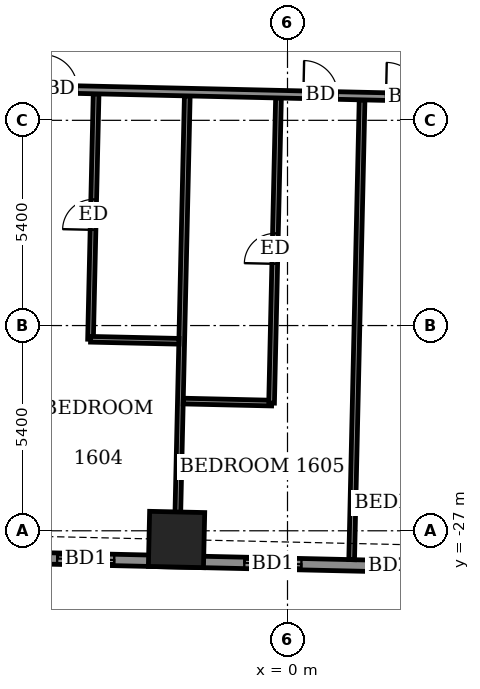
"""IFC4 building model, lengths in metres.
Left out: names, types, materials, properties, quantities, classifications, styles, units other than length and angle.
Written with IfcOpenShell. Run it as: python <this file> out.ifc"""

import sys

from ifc_helpers import new_model, si_unit, direction, frame, frame_2d, origin, origin_2d, place, context, subcontext, project, spatial, rectangle, extrude, element, fill, save


model = new_model("IFC4")
c1 = context("Model", 3, precision=1e-05, world=origin(), true_north=direction((0.0, 1.0)))
c2 = subcontext(c1, "Body", "Model", "MODEL_VIEW")
j1 = project(units=[si_unit("LENGTHUNIT", "METRE"), si_unit("PLANEANGLEUNIT", "RADIAN")], contexts=[c1])
p1 = place(None, origin())
s1 = spatial("IfcSite", under=j1, at=p1, CompositionType="ELEMENT")
p2 = place(p1, origin())
s2 = spatial("IfcBuilding", under=s1, at=p2, CompositionType="ELEMENT")
p3 = place(p2, frame((0.0, 0.0, 67.5)))
s3 = spatial("IfcBuildingStorey", under=s2, at=p3, CompositionType="ELEMENT", Elevation=67.5)
p4 = place(p3, frame((-2.92, -27.229, -0.55), z_axis=(0.0, 0.0, 1.0), x_axis=(0.999742783124, -0.022679673549, 0.0)))
e1 = element("IfcColumn", 1, at=p4, inside=s3, PredefinedType="COLUMN", context=c2, shape_type="SweptSolid", body=[
    extrude(rectangle(XDim=1.45, YDim=1.45, at=origin_2d()), origin(), (0.0, 0.0, 1.0), 3.6),
])
p5 = place(p3, frame((-24.007, -27.326, 0.0), z_axis=(0.0, 0.0, 1.0), x_axis=(0.999742536491, -0.022690542744, 0.0)))
e2 = element("IfcWall", 2, at=p5, inside=s3, PredefinedType="SOLIDWALL", context=c2, shape_type="SweptSolid", body=[
    extrude(rectangle(XDim=49.236, YDim=0.3, at=frame_2d((24.618, 0.0))), origin(), (0.0, 0.0, 1.0), 3.05),
])
p6 = place(p5, frame((1.391, 0.0, 0.0)))
e3 = element("IfcOpeningElement", 3, at=p6, cuts=e2, PredefinedType="OPENING", context=c2, shape_type="SweptSolid", body=[
    extrude(rectangle(XDim=1.2, YDim=2.4, at=frame_2d((0.6, 1.2))), frame((0.0, 0.16, 0.0), z_axis=(0.0, -1.0, 0.0), x_axis=(1.0, 0.0, 0.0)), (0.0, 0.0, 1.0), 0.32),
])
p7 = place(p5, frame((3.901, 0.0, 0.0)))
e4 = element("IfcOpeningElement", 4, at=p7, cuts=e2, PredefinedType="OPENING", context=c2, shape_type="SweptSolid", body=[
    extrude(rectangle(XDim=1.5, YDim=2.4, at=frame_2d((0.75, 1.2))), frame((0.0, 0.16, 0.0), z_axis=(0.0, -1.0, 0.0), x_axis=(1.0, 0.0, 0.0)), (0.0, 0.0, 1.0), 0.32),
])
p8 = place(p5, frame((9.1, 0.0, 0.0)))
e5 = element("IfcOpeningElement", 5, at=p8, cuts=e2, PredefinedType="OPENING", context=c2, shape_type="SweptSolid", body=[
    extrude(rectangle(XDim=1.5, YDim=2.4, at=frame_2d((0.75, 1.2))), frame((0.0, 0.16, 0.0), z_axis=(0.0, -1.0, 0.0), x_axis=(1.0, 0.0, 0.0)), (0.0, 0.0, 1.0), 0.32),
])
p9 = place(p5, frame((14.889, 0.0, 0.0)))
e6 = element("IfcOpeningElement", 6, at=p9, cuts=e2, PredefinedType="OPENING", context=c2, shape_type="SweptSolid", body=[
    extrude(rectangle(XDim=1.5, YDim=2.4, at=frame_2d((0.75, 1.2))), frame((0.0, 0.16, 0.0), z_axis=(0.0, -1.0, 0.0), x_axis=(1.0, 0.0, 0.0)), (0.0, 0.0, 1.0), 0.32),
])
p10 = place(p5, frame((17.952, 0.0, 0.0)))
e7 = element("IfcOpeningElement", 7, at=p10, cuts=e2, PredefinedType="OPENING", context=c2, shape_type="SweptSolid", body=[
    extrude(rectangle(XDim=1.5, YDim=2.4, at=frame_2d((0.75, 1.2))), frame((0.0, 0.16, 0.0), z_axis=(0.0, -1.0, 0.0), x_axis=(1.0, 0.0, 0.0)), (0.0, 0.0, 1.0), 0.32),
])
p11 = place(p5, frame((22.878, 0.0, 0.0)))
e8 = element("IfcOpeningElement", 8, at=p11, cuts=e2, PredefinedType="OPENING", context=c2, shape_type="SweptSolid", body=[
    extrude(rectangle(XDim=1.5, YDim=2.4, at=frame_2d((0.75, 1.2))), frame((0.0, 0.16, 0.0), z_axis=(0.0, -1.0, 0.0), x_axis=(1.0, 0.0, 0.0)), (0.0, 0.0, 1.0), 0.32),
])
p12 = place(p5, frame((26.091, 0.0, 0.0)))
e9 = element("IfcOpeningElement", 9, at=p12, cuts=e2, PredefinedType="OPENING", context=c2, shape_type="SweptSolid", body=[
    extrude(rectangle(XDim=1.2, YDim=2.4, at=frame_2d((0.6, 1.2))), frame((0.0, 0.16, 0.0), z_axis=(0.0, -1.0, 0.0), x_axis=(1.0, 0.0, 0.0)), (0.0, 0.0, 1.0), 0.32),
])
p13 = place(p5, frame((31.754, 0.0, 0.0)))
e10 = element("IfcOpeningElement", 10, at=p13, cuts=e2, PredefinedType="OPENING", context=c2, shape_type="SweptSolid", body=[
    extrude(rectangle(XDim=1.5, YDim=2.4, at=frame_2d((0.75, 1.2))), frame((0.0, 0.16, 0.0), z_axis=(0.0, -1.0, 0.0), x_axis=(1.0, 0.0, 0.0)), (0.0, 0.0, 1.0), 0.32),
])
p14 = place(p5, frame((36.854, 0.0, 0.0)))
e11 = element("IfcOpeningElement", 11, at=p14, cuts=e2, PredefinedType="OPENING", context=c2, shape_type="SweptSolid", body=[
    extrude(rectangle(XDim=1.5, YDim=2.4, at=frame_2d((0.75, 1.2))), frame((0.0, 0.16, 0.0), z_axis=(0.0, -1.0, 0.0), x_axis=(1.0, 0.0, 0.0)), (0.0, 0.0, 1.0), 0.32),
])
p15 = place(p5, frame((39.917, 0.0, 0.0)))
e12 = element("IfcOpeningElement", 12, at=p15, cuts=e2, PredefinedType="OPENING", context=c2, shape_type="SweptSolid", body=[
    extrude(rectangle(XDim=1.5, YDim=2.4, at=frame_2d((0.75, 1.2))), frame((0.0, 0.16, 0.0), z_axis=(0.0, -1.0, 0.0), x_axis=(1.0, 0.0, 0.0)), (0.0, 0.0, 1.0), 0.32),
])
p16 = place(p5, frame((45.072, 0.0, 0.9)))
e13 = element("IfcOpeningElement", 13, at=p16, cuts=e2, PredefinedType="OPENING", context=c2, shape_type="SweptSolid", body=[
    extrude(rectangle(XDim=2.4, YDim=1.5, at=frame_2d((1.2, 0.75))), frame((0.0, 0.16, 0.0), z_axis=(0.0, -1.0, 0.0), x_axis=(1.0, 0.0, 0.0)), (0.0, 0.0, 1.0), 0.32),
])
p17 = place(p3, frame((-2.911, -27.655, 0.0), z_axis=(0.0, 0.0, 1.0), x_axis=(0.02263616477, 0.999743769195, 0.0)))
e14 = element("IfcWall", 14, at=p17, inside=s3, PredefinedType="PARTITIONING", context=c2, shape_type="SweptSolid", body=[
    extrude(rectangle(XDim=12.101, YDim=0.15, at=frame_2d((6.051, 0.0))), origin(), (0.0, 0.0, 1.0), 3.05),
])
p18 = place(p3, frame((1.688, -27.759, 0.0), z_axis=(0.0, 0.0, 1.0), x_axis=(0.02263844782, 0.9997437175, 0.0)))
e15 = element("IfcWall", 15, at=p18, inside=s3, PredefinedType="PARTITIONING", context=c2, shape_type="SweptSolid", body=[
    extrude(rectangle(XDim=12.1, YDim=0.15, at=frame_2d((6.05, 0.0))), origin(), (0.0, 0.0, 1.0), 2.55),
])
p19 = place(p3, frame((-2.742, -23.587, 0.0), z_axis=(0.0, 0.0, 1.0), x_axis=(0.999740478815, -0.022781023197, 0.0)))
e16 = element("IfcWall", 16, at=p19, inside=s3, PredefinedType="PARTITIONING", context=c2, shape_type="SweptSolid", body=[
    extrude(rectangle(XDim=2.325, YDim=0.15, at=frame_2d((1.163, 0.0))), origin(), (0.0, 0.0, 1.0), 3.05),
])
p20 = place(p3, frame((-0.419, -23.64, 0.0), z_axis=(0.0, 0.0, 1.0), x_axis=(0.022650959747, 0.999743434098, 0.0)))
e17 = element("IfcWall", 17, at=p20, inside=s3, PredefinedType="PARTITIONING", context=c2, shape_type="SweptSolid", body=[
    extrude(rectangle(XDim=8.03, YDim=0.15, at=frame_2d((4.015, 0.0))), origin(), (0.0, 0.0, 1.0), 3.05),
])
p21 = place(p20, frame((3.665, 0.0, 0.0)))
e18 = element("IfcOpeningElement", 18, at=p21, cuts=e17, PredefinedType="OPENING", context=c2, shape_type="SweptSolid", body=[
    extrude(rectangle(XDim=0.8, YDim=2.1, at=frame_2d((0.4, 1.05))), frame((0.0, 0.085, 0.0), z_axis=(0.0, -1.0, 0.0), x_axis=(1.0, 0.0, 0.0)), (0.0, 0.0, 1.0), 0.17),
])
p22 = place(p3, frame((-5.183, -21.961, 0.0), z_axis=(0.0, 0.0, 1.0), x_axis=(0.022790087107, 0.999740272236, 0.0)))
e19 = element("IfcWall", 19, at=p22, inside=s3, PredefinedType="PARTITIONING", context=c2, shape_type="SweptSolid", body=[
    extrude(rectangle(XDim=6.46, YDim=0.15, at=frame_2d((3.23, 0.0))), origin(), (0.0, 0.0, 1.0), 3.05),
])
p23 = place(p22, frame((2.88, 0.0, 0.0)))
e20 = element("IfcOpeningElement", 20, at=p23, cuts=e19, PredefinedType="OPENING", context=c2, shape_type="SweptSolid", body=[
    extrude(rectangle(XDim=0.8, YDim=2.1, at=frame_2d((0.4, 1.05))), frame((0.0, 0.085, 0.0), z_axis=(0.0, -1.0, 0.0), x_axis=(1.0, 0.0, 0.0)), (0.0, 0.0, 1.0), 0.17),
])
p24 = place(p3, frame((-5.181, -21.961, 0.0), z_axis=(0.0, 0.0, 1.0), x_axis=(0.999740478815, -0.022781023197, 0.0)))
e21 = element("IfcWall", 21, at=p24, inside=s3, PredefinedType="PARTITIONING", context=c2, shape_type="SweptSolid", body=[
    extrude(rectangle(XDim=2.325, YDim=0.15, at=frame_2d((1.163, 0.0))), origin(), (0.0, 0.0, 1.0), 3.05),
])
p25 = place(p3, frame((-26.151, -14.924, 0.0), z_axis=(0.0, 0.0, 1.0), x_axis=(0.999742750999, -0.022681089575, 0.0)))
e22 = element("IfcWall", 22, at=p25, inside=s3, PredefinedType="PARTITIONING", context=c2, shape_type="SweptSolid", body=[
    extrude(rectangle(XDim=54.886, YDim=0.2, at=frame_2d((27.443, 0.0))), origin(), (0.0, 0.0, 1.0), 3.05),
])
p26 = place(p25, frame((1.345, 0.0, 0.0)))
e23 = element("IfcOpeningElement", 23, at=p26, cuts=e22, PredefinedType="OPENING", context=c2, shape_type="SweptSolid", body=[
    extrude(rectangle(XDim=1.0, YDim=2.1, at=frame_2d((0.5, 1.05))), frame((0.0, 0.11, 0.0), z_axis=(0.0, -1.0, 0.0), x_axis=(1.0, 0.0, 0.0)), (0.0, 0.0, 1.0), 0.22),
])
p27 = place(p25, frame((8.35, 0.0, 0.0)))
e24 = element("IfcOpeningElement", 24, at=p27, cuts=e22, PredefinedType="OPENING", context=c2, shape_type="SweptSolid", body=[
    extrude(rectangle(XDim=0.9, YDim=2.1, at=frame_2d((0.45, 1.05))), frame((0.0, 0.11, 0.0), z_axis=(0.0, -1.0, 0.0), x_axis=(1.0, 0.0, 0.0)), (0.0, 0.0, 1.0), 0.22),
])
p28 = place(p25, frame((10.625, 0.0, 0.0)))
e25 = element("IfcOpeningElement", 25, at=p28, cuts=e22, PredefinedType="OPENING", context=c2, shape_type="SweptSolid", body=[
    extrude(rectangle(XDim=0.9, YDim=2.1, at=frame_2d((0.45, 1.05))), frame((0.0, 0.11, 0.0), z_axis=(0.0, -1.0, 0.0), x_axis=(1.0, 0.0, 0.0)), (0.0, 0.0, 1.0), 0.22),
])
p29 = place(p25, frame((17.675, 0.0, 0.0)))
e26 = element("IfcOpeningElement", 26, at=p29, cuts=e22, PredefinedType="OPENING", context=c2, shape_type="SweptSolid", body=[
    extrude(rectangle(XDim=0.9, YDim=2.1, at=frame_2d((0.45, 1.05))), frame((0.0, 0.11, 0.0), z_axis=(0.0, -1.0, 0.0), x_axis=(1.0, 0.0, 0.0)), (0.0, 0.0, 1.0), 0.22),
])
p30 = place(p25, frame((19.725, 0.0, 0.0)))
e27 = element("IfcOpeningElement", 27, at=p30, cuts=e22, PredefinedType="OPENING", context=c2, shape_type="SweptSolid", body=[
    extrude(rectangle(XDim=0.9, YDim=2.1, at=frame_2d((0.45, 1.05))), frame((0.0, 0.11, 0.0), z_axis=(0.0, -1.0, 0.0), x_axis=(1.0, 0.0, 0.0)), (0.0, 0.0, 1.0), 0.22),
])
p31 = place(p25, frame((26.575, 0.0, 0.0)))
e28 = element("IfcOpeningElement", 28, at=p31, cuts=e22, PredefinedType="OPENING", context=c2, shape_type="SweptSolid", body=[
    extrude(rectangle(XDim=0.9, YDim=2.1, at=frame_2d((0.45, 1.05))), frame((0.0, 0.11, 0.0), z_axis=(0.0, -1.0, 0.0), x_axis=(1.0, 0.0, 0.0)), (0.0, 0.0, 1.0), 0.22),
])
p32 = place(p25, frame((28.75, 0.0, 0.0)))
e29 = element("IfcOpeningElement", 29, at=p32, cuts=e22, PredefinedType="OPENING", context=c2, shape_type="SweptSolid", body=[
    extrude(rectangle(XDim=0.9, YDim=2.1, at=frame_2d((0.45, 1.05))), frame((0.0, 0.11, 0.0), z_axis=(0.0, -1.0, 0.0), x_axis=(1.0, 0.0, 0.0)), (0.0, 0.0, 1.0), 0.22),
])
p33 = place(p25, frame((35.875, 0.0, 0.0)))
e30 = element("IfcOpeningElement", 30, at=p33, cuts=e22, PredefinedType="OPENING", context=c2, shape_type="SweptSolid", body=[
    extrude(rectangle(XDim=0.9, YDim=2.1, at=frame_2d((0.45, 1.05))), frame((0.0, 0.11, 0.0), z_axis=(0.0, -1.0, 0.0), x_axis=(1.0, 0.0, 0.0)), (0.0, 0.0, 1.0), 0.22),
])
p34 = place(p25, frame((38.1, 0.0, 0.0)))
e31 = element("IfcOpeningElement", 31, at=p34, cuts=e22, PredefinedType="OPENING", context=c2, shape_type="SweptSolid", body=[
    extrude(rectangle(XDim=0.9, YDim=2.1, at=frame_2d((0.45, 1.05))), frame((0.0, 0.11, 0.0), z_axis=(0.0, -1.0, 0.0), x_axis=(1.0, 0.0, 0.0)), (0.0, 0.0, 1.0), 0.22),
])
p35 = place(p25, frame((45.125, 0.0, 0.0)))
e32 = element("IfcOpeningElement", 32, at=p35, cuts=e22, PredefinedType="OPENING", context=c2, shape_type="SweptSolid", body=[
    extrude(rectangle(XDim=0.9, YDim=2.1, at=frame_2d((0.45, 1.05))), frame((0.0, 0.11, 0.0), z_axis=(0.0, -1.0, 0.0), x_axis=(1.0, 0.0, 0.0)), (0.0, 0.0, 1.0), 0.22),
])
p36 = place(p25, frame((52.618, 0.0, 0.0)))
e33 = element("IfcOpeningElement", 33, at=p36, cuts=e22, PredefinedType="OPENING", context=c2, shape_type="SweptSolid", body=[
    extrude(rectangle(XDim=1.0, YDim=2.1, at=frame_2d((0.5, 1.05))), frame((0.0, 0.11, 0.0), z_axis=(0.0, -1.0, 0.0), x_axis=(1.0, 0.0, 0.0)), (0.0, 0.0, 1.0), 0.22),
])
p37 = place(p25, frame((47.575, 0.0, 0.0)))
e34 = element("IfcOpeningElement", 34, at=p37, cuts=e22, PredefinedType="OPENING", context=c2, shape_type="SweptSolid", body=[
    extrude(rectangle(XDim=0.9, YDim=2.1, at=frame_2d((0.45, 1.05))), frame((0.0, 0.11, 0.0), z_axis=(0.0, -1.0, 0.0), x_axis=(1.0, 0.0, 0.0)), (0.0, 0.0, 1.0), 0.22),
])
p38 = place(p10, origin())
e35 = element("IfcDoor", 35, at=p38, inside=s3, OperationType="SLIDING_TO_LEFT", PredefinedType="DOOR", context=c2, shape_type="SweptSolid", body=[
    extrude(rectangle(XDim=1.5, YDim=2.4, at=frame_2d((0.75, 1.2))), frame((0.0, 0.025, 0.0), z_axis=(0.0, -1.0, 0.0), x_axis=(1.0, 0.0, 0.0)), (0.0, 0.0, 1.0), 0.05),
])
fill(e7, e35)
p39 = place(p11, origin())
e36 = element("IfcDoor", 36, at=p39, inside=s3, OperationType="SLIDING_TO_LEFT", PredefinedType="DOOR", context=c2, shape_type="SweptSolid", body=[
    extrude(rectangle(XDim=1.5, YDim=2.4, at=frame_2d((0.75, 1.2))), frame((0.0, 0.025, 0.0), z_axis=(0.0, -1.0, 0.0), x_axis=(1.0, 0.0, 0.0)), (0.0, 0.0, 1.0), 0.05),
])
fill(e8, e36)
p40 = place(p12, origin())
e37 = element("IfcDoor", 37, at=p40, inside=s3, OperationType="SLIDING_TO_LEFT", PredefinedType="DOOR", context=c2, shape_type="SweptSolid", body=[
    extrude(rectangle(XDim=1.2, YDim=2.4, at=frame_2d((0.6, 1.2))), frame((0.0, 0.025, 0.0), z_axis=(0.0, -1.0, 0.0), x_axis=(1.0, 0.0, 0.0)), (0.0, 0.0, 1.0), 0.05),
])
fill(e9, e37)
p41 = place(p30, origin())
e38 = element("IfcDoor", 38, at=p41, inside=s3, OperationType="SINGLE_SWING_RIGHT", PredefinedType="DOOR", context=c2, shape_type="SweptSolid", body=[
    extrude(rectangle(XDim=0.9, YDim=2.1, at=frame_2d((0.45, 1.05))), frame((0.0, 0.025, 0.0), z_axis=(0.0, -1.0, 0.0), x_axis=(1.0, 0.0, 0.0)), (0.0, 0.0, 1.0), 0.05),
])
fill(e27, e38)
p42 = place(p23, origin())
e39 = element("IfcDoor", 39, at=p42, inside=s3, OperationType="SINGLE_SWING_RIGHT", PredefinedType="DOOR", context=c2, shape_type="SweptSolid", body=[
    extrude(rectangle(XDim=0.8, YDim=2.1, at=frame_2d((0.4, 1.05))), frame((0.0, 0.025, 0.0), z_axis=(0.0, -1.0, 0.0), x_axis=(1.0, 0.0, 0.0)), (0.0, 0.0, 1.0), 0.05),
])
fill(e20, e39)
p43 = place(p31, origin())
e40 = element("IfcDoor", 40, at=p43, inside=s3, OperationType="SINGLE_SWING_LEFT", PredefinedType="DOOR", context=c2, shape_type="SweptSolid", body=[
    extrude(rectangle(XDim=0.9, YDim=2.1, at=frame_2d((0.45, 1.05))), frame((0.0, 0.025, 0.0), z_axis=(0.0, -1.0, 0.0), x_axis=(1.0, 0.0, 0.0)), (0.0, 0.0, 1.0), 0.05),
])
fill(e28, e40)
p44 = place(p21, origin())
e41 = element("IfcDoor", 41, at=p44, inside=s3, OperationType="SINGLE_SWING_LEFT", PredefinedType="DOOR", context=c2, shape_type="SweptSolid", body=[
    extrude(rectangle(XDim=0.8, YDim=2.1, at=frame_2d((0.4, 1.05))), frame((0.0, 0.025, 0.0), z_axis=(0.0, -1.0, 0.0), x_axis=(1.0, 0.0, 0.0)), (0.0, 0.0, 1.0), 0.05),
])
fill(e18, e41)
p45 = place(p32, origin())
e42 = element("IfcDoor", 42, at=p45, inside=s3, OperationType="SINGLE_SWING_RIGHT", PredefinedType="DOOR", context=c2, shape_type="SweptSolid", body=[
    extrude(rectangle(XDim=0.9, YDim=2.1, at=frame_2d((0.45, 1.05))), frame((0.0, 0.025, 0.0), z_axis=(0.0, -1.0, 0.0), x_axis=(1.0, 0.0, 0.0)), (0.0, 0.0, 1.0), 0.05),
])
fill(e29, e42)
save(model, sys.argv[1])
